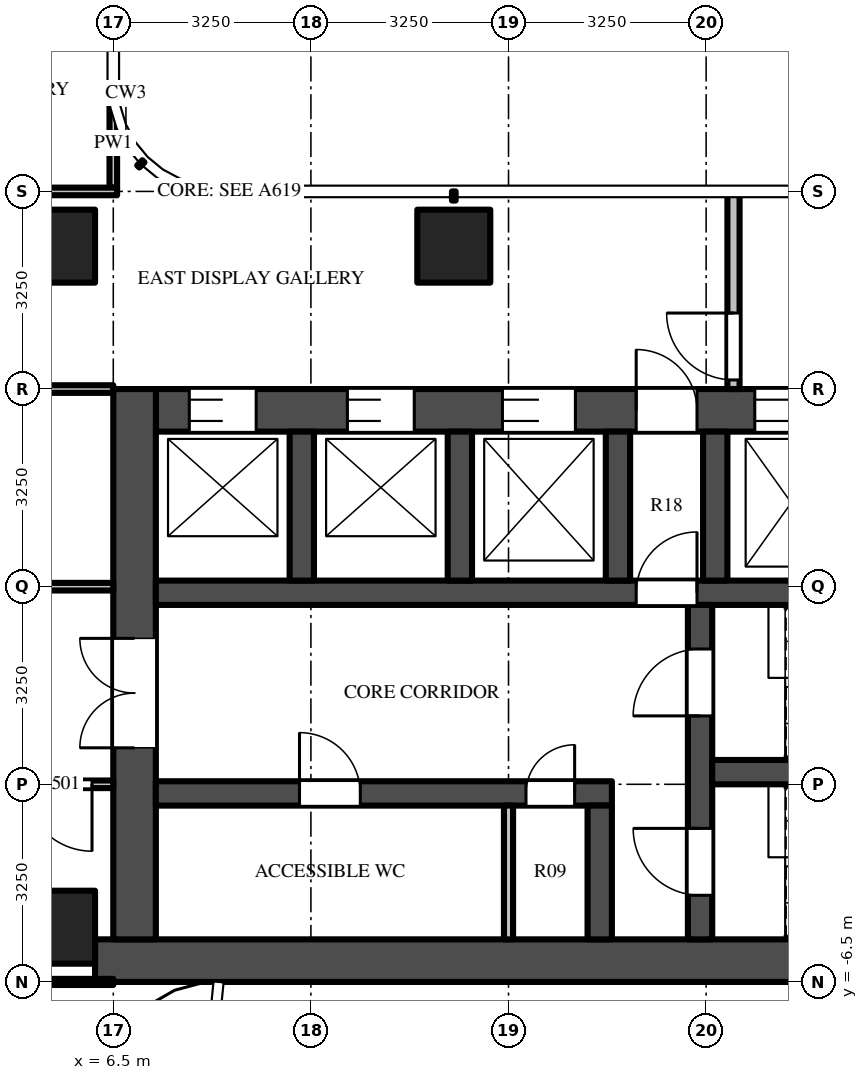
"""IFC4 building model, lengths in metres.
Left out: names, types, materials, properties, quantities, classifications, styles, units other than length and angle.
Written with IfcOpenShell. Run it as: python <this file> out.ifc"""

import sys

from ifc_helpers import new_model, si_unit, direction, frame, frame_2d, origin, origin_2d, place, context, subcontext, project, spatial, rectangle, extrude, source, transform, mapped, element, fill, save


model = new_model("IFC4")
c1 = context("Model", 3, precision=1e-05, world=origin(), true_north=direction((0.0, 1.0)))
c2 = subcontext(c1, "Body", "Model", "MODEL_VIEW")
j1 = project(units=[si_unit("LENGTHUNIT", "METRE"), si_unit("PLANEANGLEUNIT", "RADIAN")], contexts=[c1])
p1 = place(None, origin())
s1 = spatial("IfcSite", under=j1, at=p1, CompositionType="ELEMENT")
p2 = place(p1, origin())
s2 = spatial("IfcBuilding", under=s1, at=p2, CompositionType="ELEMENT")
p3 = place(p2, frame((0.0, 0.0, 162.0)))
s3 = spatial("IfcBuildingStorey", under=s2, at=p3, CompositionType="ELEMENT", Elevation=162.0)
m1 = source(origin(), c2, "Body", "SweptSolid", [
    extrude(rectangle(XDim=1.2, YDim=1.2, at=origin_2d()), origin(), (0.0, 0.0, 1.0), 3.9),
])
for number, where, z_axis, x_axis in (
    (1, (12.1, 5.6, 0.0), (0.0, 0.0, 1.0), (1.0, 0.0, 0.0)),
    (2, (5.6, 5.6, 0.0), (0.0, 0.0, 1.0), (1.0, 0.0, 0.0)),
    (3, (5.6, -5.6, 0.0), (0.0, 0.0, 1.0), (1.0, 0.0, 0.0)),
):
    element("IfcColumn", number, at=place(p3, frame(where, z_axis=z_axis, x_axis=x_axis)), inside=s3, PredefinedType="COLUMN", context=c2, shape_type="MappedRepresentation", body=[
        mapped(m1, transform((0.0, 0.0, 0.0))),
    ])
m2 = source(origin(), c2, "Body", "SweptSolid", [
    extrude(rectangle(XDim=16.55, YDim=0.7, at=frame_2d((8.275, 0.0))), origin(), (0.0, 0.0, 1.0), 3.7),
])
p4 = place(p3, frame((6.2, -6.15, 0.0), z_axis=(0.0, 0.0, 1.0), x_axis=(1.0, 0.0, 0.0)))
e4 = element("IfcWall", 4, at=p4, inside=s3, PredefinedType="SHEAR", context=c2, shape_type="MappedRepresentation", body=[
    mapped(m2, transform((0.0, 0.0, 0.0))),
])
m3 = source(origin(), c2, "Body", "SweptSolid", [
    extrude(rectangle(XDim=14.85, YDim=0.7, at=frame_2d((7.425, 0.0))), origin(), (0.0, 0.0, 1.0), 3.7),
])
p5 = place(p3, frame((7.2, 2.9, 0.0), z_axis=(0.0, 0.0, 1.0), x_axis=(1.0, 0.0, 0.0)))
e5 = element("IfcWall", 5, at=p5, inside=s3, PredefinedType="SHEAR", context=c2, shape_type="MappedRepresentation", body=[
    mapped(m3, transform((0.0, 0.0, 0.0))),
])
m4 = source(origin(), c2, "Body", "SweptSolid", [
    extrude(rectangle(XDim=1.1, YDim=2.1, at=frame_2d((0.55, 1.05))), frame((0.0, 0.36, 0.0), z_axis=(0.0, -1.0, 0.0), x_axis=(1.0, 0.0, 0.0)), (0.0, 0.0, 1.0), 0.72),
])
p6 = place(p5, frame((0.55, 0.0, 0.0)))
e6 = element("IfcOpeningElement", 6, at=p6, cuts=e5, PredefinedType="OPENING", context=c2, shape_type="MappedRepresentation", body=[
    mapped(m4, transform((0.0, 0.0, 0.0))),
])
p7 = place(p5, frame((3.15, 0.0, 0.0)))
e7 = element("IfcOpeningElement", 7, at=p7, cuts=e5, PredefinedType="OPENING", context=c2, shape_type="MappedRepresentation", body=[
    mapped(m4, transform((0.0, 0.0, 0.0))),
])
m5 = source(origin(), c2, "Body", "SweptSolid", [
    extrude(rectangle(XDim=1.2, YDim=2.1, at=frame_2d((0.6, 1.05))), frame((0.0, 0.36, 0.0), z_axis=(0.0, -1.0, 0.0), x_axis=(1.0, 0.0, 0.0)), (0.0, 0.0, 1.0), 0.72),
])
p8 = place(p5, frame((5.7, 0.0, 0.0)))
e8 = element("IfcOpeningElement", 8, at=p8, cuts=e5, PredefinedType="OPENING", context=c2, shape_type="MappedRepresentation", body=[
    mapped(m5, transform((0.0, 0.0, 0.0))),
])
m6 = source(origin(), c2, "Body", "SweptSolid", [
    extrude(rectangle(XDim=1.3, YDim=2.1, at=frame_2d((0.65, 1.05))), frame((0.0, 0.36, 0.0), z_axis=(0.0, -1.0, 0.0), x_axis=(1.0, 0.0, 0.0)), (0.0, 0.0, 1.0), 0.72),
])
p9 = place(p5, frame((12.2, 0.0, 0.0)))
e9 = element("IfcOpeningElement", 9, at=p9, cuts=e5, PredefinedType="OPENING", context=c2, shape_type="MappedRepresentation", body=[
    mapped(m6, transform((0.0, 0.0, 0.0))),
])
p10 = place(p5, frame((9.85, 0.0, 0.0)))
e10 = element("IfcOpeningElement", 10, at=p10, cuts=e5, PredefinedType="OPENING", context=c2, shape_type="MappedRepresentation", body=[
    mapped(m5, transform((0.0, 0.0, 0.0))),
])
m7 = source(origin(), c2, "Body", "SweptSolid", [
    extrude(rectangle(XDim=1.0, YDim=2.1, at=frame_2d((0.5, 1.05))), frame((0.0, 0.36, 0.0), z_axis=(0.0, -1.0, 0.0), x_axis=(1.0, 0.0, 0.0)), (0.0, 0.0, 1.0), 0.72),
])
p11 = place(p5, frame((7.9, 0.0, 0.0)))
e11 = element("IfcOpeningElement", 11, at=p11, cuts=e5, PredefinedType="OPENING", context=c2, shape_type="MappedRepresentation", body=[
    mapped(m7, transform((0.0, 0.0, 0.0))),
])
m8 = source(origin(), c2, "Body", "SweptSolid", [
    extrude(rectangle(XDim=9.05, YDim=0.7, at=frame_2d((4.525, 0.0))), origin(), (0.0, 0.0, 1.0), 3.7),
])
p12 = place(p3, frame((6.85, -5.8, 0.0), z_axis=(0.0, 0.0, 1.0), x_axis=(0.0, 1.0, 0.0)))
e12 = element("IfcWall", 12, at=p12, inside=s3, PredefinedType="SHEAR", context=c2, shape_type="MappedRepresentation", body=[
    mapped(m8, transform((0.0, 0.0, 0.0))),
])
m9 = source(origin(), c2, "Body", "SweptSolid", [
    extrude(rectangle(XDim=1.8, YDim=2.1, at=frame_2d((0.9, 1.05))), frame((0.0, 0.36, 0.0), z_axis=(0.0, -1.0, 0.0), x_axis=(1.0, 0.0, 0.0)), (0.0, 0.0, 1.0), 0.72),
])
p13 = place(p12, frame((3.15, 0.0, 0.0)))
e13 = element("IfcOpeningElement", 13, at=p13, cuts=e12, PredefinedType="OPENING", context=c2, shape_type="MappedRepresentation", body=[
    mapped(m9, transform((0.0, 0.0, 0.0))),
])
m10 = source(origin(), c2, "Body", "SweptSolid", [
    extrude(rectangle(XDim=7.5, YDim=0.4, at=frame_2d((3.75, 0.0))), origin(), (0.0, 0.0, 1.0), 3.7),
])
p14 = place(p3, frame((7.2, -3.4, 0.0), z_axis=(0.0, 0.0, 1.0), x_axis=(1.0, 0.0, 0.0)))
e14 = element("IfcWall", 14, at=p14, inside=s3, PredefinedType="SHEAR", context=c2, shape_type="MappedRepresentation", body=[
    mapped(m10, transform((0.0, 0.0, 0.0))),
])
m11 = source(origin(), c2, "Body", "SweptSolid", [
    extrude(rectangle(XDim=1.0, YDim=2.1, at=frame_2d((0.5, 1.05))), frame((0.0, 0.21, 0.0), z_axis=(0.0, -1.0, 0.0), x_axis=(1.0, 0.0, 0.0)), (0.0, 0.0, 1.0), 0.42),
])
p15 = place(p14, frame((2.363, 0.0, 0.0)))
e15 = element("IfcOpeningElement", 15, at=p15, cuts=e14, PredefinedType="OPENING", context=c2, shape_type="MappedRepresentation", body=[
    mapped(m11, transform((0.0, 0.0, 0.0))),
])
m12 = source(origin(), c2, "Body", "SweptSolid", [
    extrude(rectangle(XDim=0.8, YDim=2.1, at=frame_2d((0.4, 1.05))), frame((0.0, 0.21, 0.0), z_axis=(0.0, -1.0, 0.0), x_axis=(1.0, 0.0, 0.0)), (0.0, 0.0, 1.0), 0.42),
])
p16 = place(p14, frame((6.087, 0.0, 0.0)))
e16 = element("IfcOpeningElement", 16, at=p16, cuts=e14, PredefinedType="OPENING", context=c2, shape_type="MappedRepresentation", body=[
    mapped(m12, transform((0.0, 0.0, 0.0))),
])
m13 = source(origin(), c2, "Body", "SweptSolid", [
    extrude(rectangle(XDim=14.85, YDim=0.4, at=frame_2d((7.425, 0.0))), origin(), (0.0, 0.0, 1.0), 3.7),
])
p17 = place(p3, frame((7.2, -0.1, 0.0), z_axis=(0.0, 0.0, 1.0), x_axis=(1.0, 0.0, 0.0)))
e17 = element("IfcWall", 17, at=p17, inside=s3, PredefinedType="SHEAR", context=c2, shape_type="MappedRepresentation", body=[
    mapped(m13, transform((0.0, 0.0, 0.0))),
])
p18 = place(p17, frame((7.9, 0.0, 0.0)))
e18 = element("IfcOpeningElement", 18, at=p18, cuts=e17, PredefinedType="OPENING", context=c2, shape_type="MappedRepresentation", body=[
    mapped(m11, transform((0.0, 0.0, 0.0))),
])
m14 = source(origin(), c2, "Body", "SweptSolid", [
    extrude(rectangle(XDim=5.5, YDim=0.4, at=frame_2d((2.75, 0.0))), origin(), (0.0, 0.0, 1.0), 3.7),
])
p19 = place(p3, frame((16.15, -5.8, 0.0), z_axis=(0.0, 0.0, 1.0), x_axis=(0.0, 1.0, 0.0)))
e19 = element("IfcWall", 19, at=p19, inside=s3, PredefinedType="SHEAR", context=c2, shape_type="MappedRepresentation", body=[
    mapped(m14, transform((0.0, 0.0, 0.0))),
])
m15 = source(origin(), c2, "Body", "SweptSolid", [
    extrude(rectangle(XDim=1.1, YDim=2.1, at=frame_2d((0.55, 1.05))), frame((0.0, 0.21, 0.0), z_axis=(0.0, -1.0, 0.0), x_axis=(1.0, 0.0, 0.0)), (0.0, 0.0, 1.0), 0.42),
])
p20 = place(p19, frame((0.725, 0.0, 0.0)))
e20 = element("IfcOpeningElement", 20, at=p20, cuts=e19, PredefinedType="OPENING", context=c2, shape_type="MappedRepresentation", body=[
    mapped(m15, transform((0.0, 0.0, 0.0))),
])
p21 = place(p19, frame((3.675, 0.0, 0.0)))
e21 = element("IfcOpeningElement", 21, at=p21, cuts=e19, PredefinedType="OPENING", context=c2, shape_type="MappedRepresentation", body=[
    mapped(m15, transform((0.0, 0.0, 0.0))),
])
m16 = source(origin(), c2, "Body", "SweptSolid", [
    extrude(rectangle(XDim=5.7, YDim=0.4, at=frame_2d((2.85, 0.0))), origin(), (0.0, 0.0, 1.0), 3.7),
])
p22 = place(p3, frame((16.35, -3.05, 0.0), z_axis=(0.0, 0.0, 1.0), x_axis=(1.0, 0.0, 0.0)))
e22 = element("IfcWall", 22, at=p22, inside=s3, PredefinedType="SHEAR", context=c2, shape_type="MappedRepresentation", body=[
    mapped(m16, transform((0.0, 0.0, 0.0))),
])
m17 = source(origin(), c2, "Body", "SweptSolid", [
    extrude(rectangle(XDim=2.2, YDim=0.4, at=frame_2d((1.1, 0.0))), origin(), (0.0, 0.0, 1.0), 3.7),
])
p23 = place(p3, frame((14.5, -5.8, 0.0), z_axis=(0.0, 0.0, 1.0), x_axis=(0.0, 1.0, 0.0)))
e23 = element("IfcWall", 23, at=p23, inside=s3, PredefinedType="SHEAR", context=c2, shape_type="MappedRepresentation", body=[
    mapped(m17, transform((0.0, 0.0, 0.0))),
])
m18 = source(origin(), c2, "Body", "SweptSolid", [
    extrude(rectangle(XDim=2.45, YDim=0.4, at=frame_2d((1.225, 0.0))), origin(), (0.0, 0.0, 1.0), 3.7),
])
for number, where, z_axis, x_axis in (
    (24, (9.6, 0.1, 0.0), (0.0, 0.0, 1.0), (0.0, 1.0, 0.0)),
    (25, (12.2, 0.1, 0.0), (0.0, 0.0, 1.0), (0.0, 1.0, 0.0)),
    (26, (14.8, 0.1, 0.0), (0.0, 0.0, 1.0), (0.0, 1.0, 0.0)),
    (27, (16.4, 0.1, 0.0), (0.0, 0.0, 1.0), (0.0, 1.0, 0.0)),
):
    element("IfcWall", number, at=place(p3, frame(where, z_axis=z_axis, x_axis=x_axis)), inside=s3, PredefinedType="SHEAR", context=c2, shape_type="MappedRepresentation", body=[
        mapped(m18, transform((0.0, 0.0, 0.0))),
    ])
m19 = source(origin(), c2, "Body", "SweptSolid", [
    extrude(rectangle(XDim=3.25, YDim=0.2, at=frame_2d((1.625, 0.0))), origin(), (0.0, 0.0, 1.0), 3.7),
])
p24 = place(p3, frame((16.7, 3.25, 0.0), z_axis=(0.0, 0.0, 1.0), x_axis=(0.0, 1.0, 0.0)))
e28 = element("IfcWall", 28, at=p24, inside=s3, PredefinedType="PARTITIONING", context=c2, shape_type="MappedRepresentation", body=[
    mapped(m19, transform((0.0, 0.0, 0.0))),
])
m20 = source(origin(), c2, "Body", "SweptSolid", [
    extrude(rectangle(XDim=1.1, YDim=2.1, at=frame_2d((0.55, 1.05))), frame((0.0, 0.11, 0.0), z_axis=(0.0, -1.0, 0.0), x_axis=(1.0, 0.0, 0.0)), (0.0, 0.0, 1.0), 0.22),
])
p25 = place(p24, frame((0.15, 0.0, 0.0)))
e29 = element("IfcOpeningElement", 29, at=p25, cuts=e28, PredefinedType="OPENING", context=c2, shape_type="MappedRepresentation", body=[
    mapped(m20, transform((0.0, 0.0, 0.0))),
])
m21 = source(origin(), c2, "Body", "SweptSolid", [
    extrude(rectangle(XDim=2.2, YDim=0.15, at=frame_2d((1.1, 0.0))), origin(), (0.0, 0.0, 1.0), 3.7),
])
p26 = place(p3, frame((13.0, -5.8, 0.0), z_axis=(0.0, 0.0, 1.0), x_axis=(0.0, 1.0, 0.0)))
e30 = element("IfcWall", 30, at=p26, inside=s3, PredefinedType="PARTITIONING", context=c2, shape_type="MappedRepresentation", body=[
    mapped(m21, transform((0.0, 0.0, 0.0))),
])
m22 = source(origin(), c2, "Body", "SweptSolid", [
    extrude(rectangle(XDim=1.469, YDim=0.125, at=frame_2d((0.734, 0.0))), origin(), (0.0, 0.0, 1.0), 3.7),
])
p27 = place(p3, frame((6.5, 6.562, 0.0), z_axis=(0.0, 0.0, 1.0), x_axis=(0.0, 1.0, 0.0)))
e31 = element("IfcWall", 31, at=p27, inside=s3, PredefinedType="PARTITIONING", context=c2, shape_type="MappedRepresentation", body=[
    mapped(m22, transform((0.0, 0.0, 0.0))),
])
m23 = source(origin(), c2, "Body", "SweptSolid", [
    extrude(rectangle(XDim=5.363, YDim=0.1, at=frame_2d((2.681, 0.0))), origin(), (0.0, 0.0, 1.0), 2.78),
])
p28 = place(p3, frame((1.137, -6.5, 0.0), z_axis=(0.0, 0.0, 1.0), x_axis=(1.0, 0.0, 0.0)))
e32 = element("IfcWall", 32, at=p28, inside=s3, PredefinedType="PARTITIONING", context=c2, shape_type="MappedRepresentation", body=[
    mapped(m23, transform((0.0, 0.0, 0.0))),
])
m24 = source(origin(), c2, "Body", "SweptSolid", [
    extrude(rectangle(XDim=5.363, YDim=0.125, at=frame_2d((2.681, 0.0))), origin(), (0.0, 0.0, 1.0), 2.997),
])
p29 = place(p3, frame((6.5, -3.25, 0.0), z_axis=(0.0, 0.0, 1.0), x_axis=(-1.0, 0.0, 0.0)))
e33 = element("IfcWall", 33, at=p29, inside=s3, PredefinedType="PARTITIONING", context=c2, shape_type="MappedRepresentation", body=[
    mapped(m24, transform((0.0, 0.0, 0.0))),
])
m25 = source(origin(), c2, "Body", "SweptSolid", [
    extrude(rectangle(XDim=1.1, YDim=2.1, at=frame_2d((0.55, 1.05))), frame((0.0, 0.073, 0.0), z_axis=(0.0, -1.0, 0.0), x_axis=(1.0, 0.0, 0.0)), (0.0, 0.0, 1.0), 0.145),
])
p30 = place(p29, frame((0.35, 0.0, 0.0)))
e34 = element("IfcOpeningElement", 34, at=p30, cuts=e33, PredefinedType="OPENING", context=c2, shape_type="MappedRepresentation", body=[
    mapped(m25, transform((0.0, 0.0, 0.0))),
])
p31 = place(p3, frame((6.5, 0.0, 0.0), z_axis=(0.0, 0.0, 1.0), x_axis=(-1.0, 0.0, 0.0)))
e35 = element("IfcWall", 35, at=p31, inside=s3, PredefinedType="PARTITIONING", context=c2, shape_type="MappedRepresentation", body=[
    mapped(m24, transform((0.0, 0.0, 0.0))),
])
m26 = source(origin(), c2, "Body", "SweptSolid", [
    extrude(rectangle(XDim=1.0, YDim=2.1, at=frame_2d((0.5, 1.05))), frame((0.0, 0.073, 0.0), z_axis=(0.0, -1.0, 0.0), x_axis=(1.0, 0.0, 0.0)), (0.0, 0.0, 1.0), 0.145),
])
p32 = place(p31, frame((3.95, 0.0, 0.0)))
e36 = element("IfcOpeningElement", 36, at=p32, cuts=e35, PredefinedType="OPENING", context=c2, shape_type="MappedRepresentation", body=[
    mapped(m26, transform((0.0, 0.0, 0.0))),
])
p33 = place(p3, frame((1.137, 3.25, 0.0), z_axis=(0.0, 0.0, 1.0), x_axis=(1.0, 0.0, 0.0)))
e37 = element("IfcWall", 37, at=p33, inside=s3, PredefinedType="PARTITIONING", context=c2, shape_type="MappedRepresentation", body=[
    mapped(m24, transform((0.0, 0.0, 0.0))),
])
m27 = source(origin(), c2, "Body", "SweptSolid", [
    extrude(rectangle(XDim=3.725, YDim=0.125, at=frame_2d((1.863, 0.0))), origin(), (0.0, 0.0, 1.0), 2.78),
])
p34 = place(p3, frame((2.837, 6.5, 0.0), z_axis=(0.0, 0.0, 1.0), x_axis=(1.0, 0.0, 0.0)))
e38 = element("IfcWall", 38, at=p34, inside=s3, PredefinedType="PARTITIONING", context=c2, shape_type="MappedRepresentation", body=[
    mapped(m27, transform((0.0, 0.0, 0.0))),
])
m28 = source(origin(), c2, "Body", "SweptSolid", [
    extrude(rectangle(XDim=1.1, YDim=2.1, at=frame_2d((0.55, 1.05))), frame((0.0, -0.275, 0.0), z_axis=(0.0, -1.0, 0.0), x_axis=(1.0, 0.0, 0.0)), (0.0, 0.0, 1.0), 0.05),
])
p35 = place(p6, origin())
e39 = element("IfcDoor", 39, at=p35, inside=s3, OperationType="DOUBLE_DOOR_SLIDING", PredefinedType="DOOR", context=c2, shape_type="MappedRepresentation", body=[
    mapped(m28, transform((0.0, 0.0, 0.0))),
])
fill(e6, e39)
p36 = place(p7, origin())
e40 = element("IfcDoor", 40, at=p36, inside=s3, OperationType="DOUBLE_DOOR_SLIDING", PredefinedType="DOOR", context=c2, shape_type="MappedRepresentation", body=[
    mapped(m28, transform((0.0, 0.0, 0.0))),
])
fill(e7, e40)
m29 = source(origin(), c2, "Body", "SweptSolid", [
    extrude(rectangle(XDim=1.2, YDim=2.1, at=frame_2d((0.6, 1.05))), frame((0.0, -0.275, 0.0), z_axis=(0.0, -1.0, 0.0), x_axis=(1.0, 0.0, 0.0)), (0.0, 0.0, 1.0), 0.05),
])
p37 = place(p8, origin())
e41 = element("IfcDoor", 41, at=p37, inside=s3, OperationType="DOUBLE_DOOR_SLIDING", PredefinedType="DOOR", context=c2, shape_type="MappedRepresentation", body=[
    mapped(m29, transform((0.0, 0.0, 0.0))),
])
fill(e8, e41)
p38 = place(p10, origin())
e42 = element("IfcDoor", 42, at=p38, inside=s3, OperationType="DOUBLE_DOOR_SLIDING", PredefinedType="DOOR", context=c2, shape_type="MappedRepresentation", body=[
    mapped(m29, transform((0.0, 0.0, 0.0))),
])
fill(e10, e42)
m30 = source(origin(), c2, "Body", "SweptSolid", [
    extrude(rectangle(XDim=1.8, YDim=2.1, at=frame_2d((0.9, 1.05))), frame((0.0, -0.275, 0.0), z_axis=(0.0, -1.0, 0.0), x_axis=(1.0, 0.0, 0.0)), (0.0, 0.0, 1.0), 0.05),
])
p39 = place(p13, origin())
e43 = element("IfcDoor", 43, at=p39, inside=s3, OperationType="DOUBLE_DOOR_SINGLE_SWING", PredefinedType="DOOR", context=c2, shape_type="MappedRepresentation", body=[
    mapped(m30, transform((0.0, 0.0, 0.0))),
])
fill(e13, e43)
m31 = source(origin(), c2, "Body", "SweptSolid", [
    extrude(rectangle(XDim=1.1, YDim=2.1, at=frame_2d((0.55, 1.05))), frame((0.0, 0.025, 0.0), z_axis=(0.0, -1.0, 0.0), x_axis=(1.0, 0.0, 0.0)), (0.0, 0.0, 1.0), 0.05),
])
p40 = place(p20, origin())
e44 = element("IfcDoor", 44, at=p40, inside=s3, OperationType="SINGLE_SWING_RIGHT", PredefinedType="DOOR", context=c2, shape_type="MappedRepresentation", body=[
    mapped(m31, transform((0.0, 0.0, 0.0))),
])
fill(e20, e44)
p41 = place(p21, origin())
e45 = element("IfcDoor", 45, at=p41, inside=s3, OperationType="SINGLE_SWING_LEFT", PredefinedType="DOOR", context=c2, shape_type="MappedRepresentation", body=[
    mapped(m31, transform((0.0, 0.0, 0.0))),
])
fill(e21, e45)
m32 = source(origin(), c2, "Body", "SweptSolid", [
    extrude(rectangle(XDim=1.0, YDim=2.1, at=frame_2d((0.5, 1.05))), frame((0.0, 0.025, 0.0), z_axis=(0.0, -1.0, 0.0), x_axis=(1.0, 0.0, 0.0)), (0.0, 0.0, 1.0), 0.05),
])
p42 = place(p18, origin())
e46 = element("IfcDoor", 46, at=p42, inside=s3, OperationType="SINGLE_SWING_RIGHT", PredefinedType="DOOR", context=c2, shape_type="MappedRepresentation", body=[
    mapped(m32, transform((0.0, 0.0, 0.0))),
])
fill(e18, e46)
m33 = source(origin(), c2, "Body", "SweptSolid", [
    extrude(rectangle(XDim=1.0, YDim=2.1, at=frame_2d((0.5, 1.05))), frame((0.0, -0.275, 0.0), z_axis=(0.0, -1.0, 0.0), x_axis=(1.0, 0.0, 0.0)), (0.0, 0.0, 1.0), 0.05),
])
p43 = place(p11, origin())
e47 = element("IfcDoor", 47, at=p43, inside=s3, OperationType="SINGLE_SWING_LEFT", PredefinedType="DOOR", context=c2, shape_type="MappedRepresentation", body=[
    mapped(m33, transform((0.0, 0.0, 0.0))),
])
fill(e11, e47)
p44 = place(p25, origin())
e48 = element("IfcDoor", 48, at=p44, inside=s3, OperationType="SINGLE_SWING_RIGHT", PredefinedType="DOOR", context=c2, shape_type="MappedRepresentation", body=[
    mapped(m31, transform((0.0, 0.0, 0.0))),
])
fill(e29, e48)
p45 = place(p15, origin())
e49 = element("IfcDoor", 49, at=p45, inside=s3, OperationType="SINGLE_SWING_LEFT", PredefinedType="DOOR", context=c2, shape_type="MappedRepresentation", body=[
    mapped(m32, transform((0.0, 0.0, 0.0))),
])
fill(e15, e49)
m34 = source(origin(), c2, "Body", "SweptSolid", [
    extrude(rectangle(XDim=0.8, YDim=2.1, at=frame_2d((0.4, 1.05))), frame((0.0, 0.025, 0.0), z_axis=(0.0, -1.0, 0.0), x_axis=(1.0, 0.0, 0.0)), (0.0, 0.0, 1.0), 0.05),
])
p46 = place(p16, origin())
e50 = element("IfcDoor", 50, at=p46, inside=s3, OperationType="SINGLE_SWING_RIGHT", PredefinedType="DOOR", context=c2, shape_type="MappedRepresentation", body=[
    mapped(m34, transform((0.0, 0.0, 0.0))),
])
fill(e16, e50)
p47 = place(p30, origin())
e51 = element("IfcDoor", 51, at=p47, inside=s3, OperationType="SINGLE_SWING_LEFT", PredefinedType="DOOR", context=c2, shape_type="MappedRepresentation", body=[
    mapped(m31, transform((0.0, 0.0, 0.0))),
])
fill(e34, e51)
save(model, sys.argv[1])
